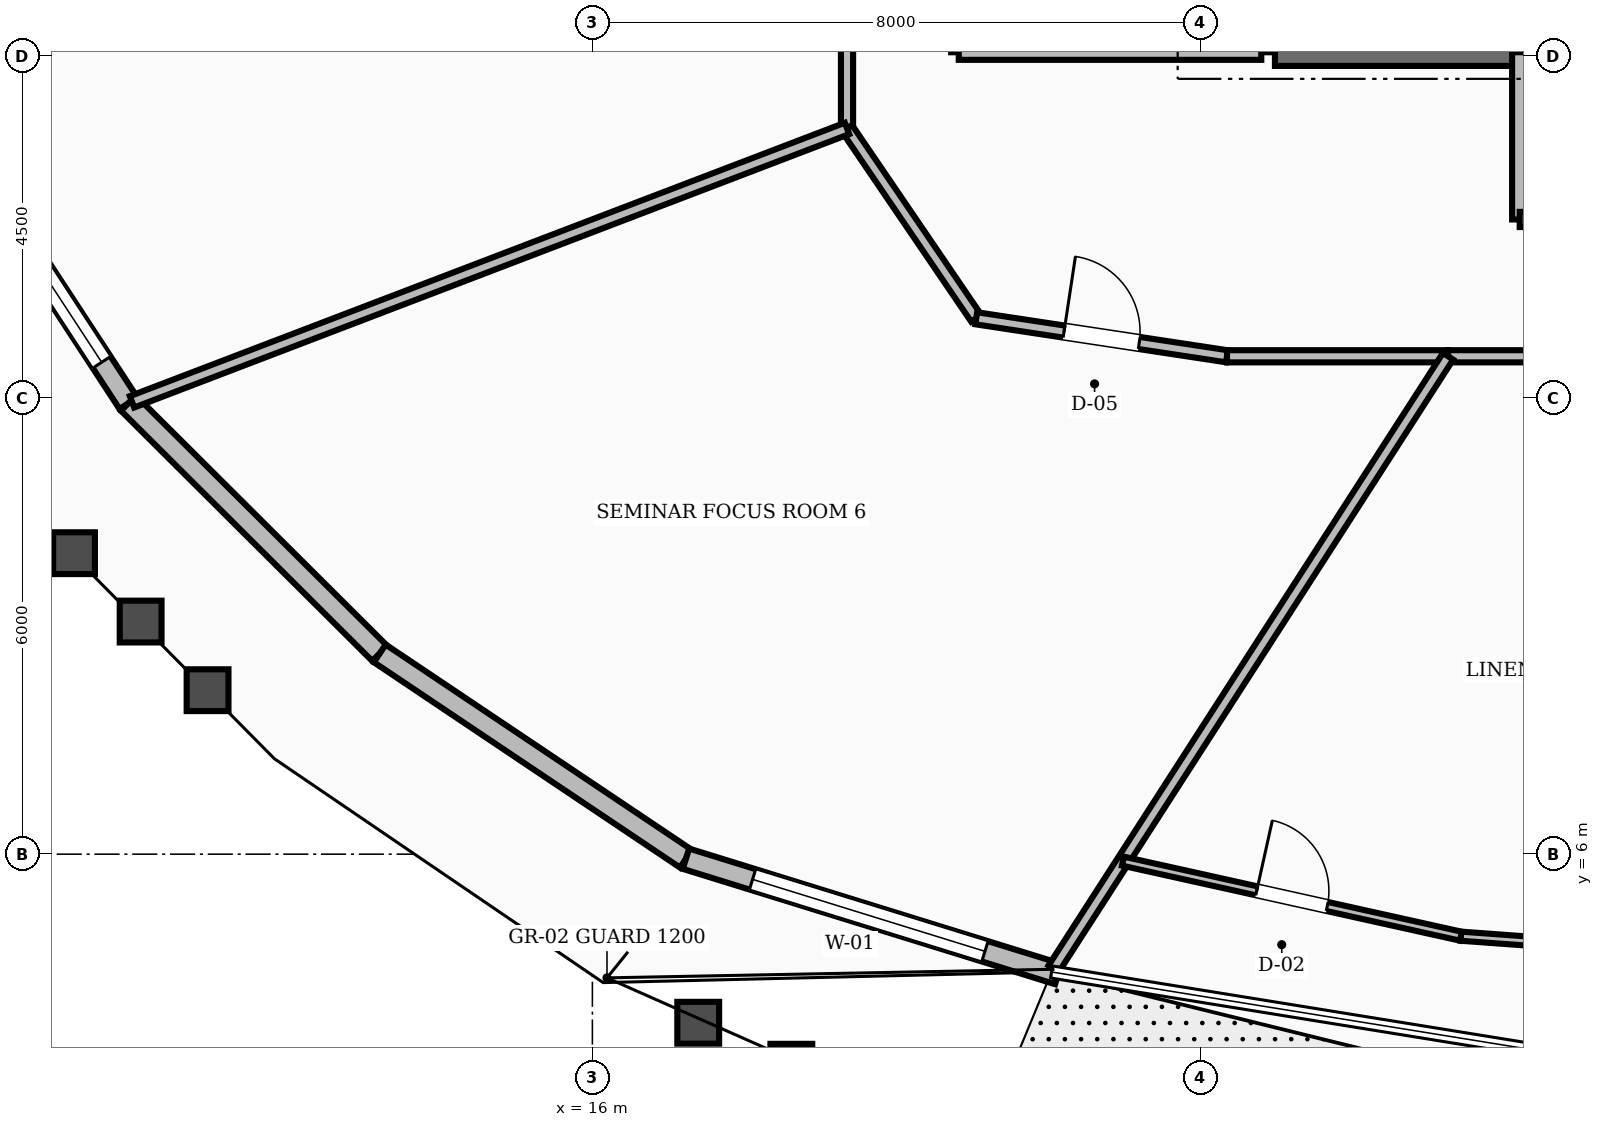
"""IFC4 building model, lengths in metres.
Left out: names, types, materials, properties, quantities, classifications, styles, units other than length and angle.
Written with IfcOpenShell. Run it as: python <this file> out.ifc"""

import sys

from ifc_helpers import new_model, si_unit, direction, frame, frame_2d, origin, place, context, subcontext, project, spatial, rectangle, extrude, element, fill, save


model = new_model("IFC4")
c1 = context("Model", 3, precision=1e-05, world=origin(), true_north=direction((0.0, 1.0)))
c2 = subcontext(c1, "Body", "Model", "MODEL_VIEW")
j1 = project(units=[si_unit("LENGTHUNIT", "METRE"), si_unit("PLANEANGLEUNIT", "RADIAN")], contexts=[c1])
p1 = place(None, origin())
s1 = spatial("IfcSite", under=j1, at=p1, CompositionType="ELEMENT")
p2 = place(p1, origin())
s2 = spatial("IfcBuilding", under=s1, at=p2, CompositionType="ELEMENT")
p3 = place(p2, frame((0.0, 0.0, 131.6)))
s3 = spatial("IfcBuildingStorey", under=s2, at=p3, CompositionType="ELEMENT", Elevation=131.6)
p4 = place(p3, frame((24.98, 16.55, 0.0), z_axis=(0.0, 0.0, 1.0), x_axis=(1.0, 0.0, 0.0)))
e1 = element("IfcWall", 1, at=p4, inside=s3, PredefinedType="SHEAR", context=c2, shape_type="SweptSolid", body=[
    extrude(rectangle(XDim=3.22, YDim=0.36, at=frame_2d((1.61, 0.0))), origin(), (0.0, 0.0, 1.0), 3.6),
])
p5 = place(p3, frame((7.44, 15.688, 0.0), z_axis=(0.0, 0.0, 1.0), x_axis=(0.547422319482, -0.836856501518, 0.0)))
e2 = element("IfcWall", 2, at=p5, inside=s3, PredefinedType="STANDARD", context=c2, shape_type="SweptSolid", body=[
    extrude(rectangle(XDim=4.488, YDim=0.28, at=frame_2d((2.244, 0.0))), origin(), (0.0, 0.0, 1.0), 2.82),
])
p6 = place(p5, frame((0.644, 0.0, 0.8)))
e3 = element("IfcOpeningElement", 3, at=p6, cuts=e2, PredefinedType="OPENING", context=c2, shape_type="SweptSolid", body=[
    extrude(rectangle(XDim=3.2, YDim=1.65, at=frame_2d((1.6, 0.825))), frame((0.0, 0.15, 0.0), z_axis=(0.0, -1.0, 0.0), x_axis=(1.0, 0.0, 0.0)), (0.0, 0.0, 1.0), 0.3),
])
p7 = place(p3, frame((9.896, 11.933, 0.0), z_axis=(0.0, 0.0, 1.0), x_axis=(0.708648936292, -0.705561255379, 0.0)))
e4 = element("IfcWall", 4, at=p7, inside=s3, PredefinedType="STANDARD", context=c2, shape_type="SweptSolid", body=[
    extrude(rectangle(XDim=4.665, YDim=0.28, at=frame_2d((2.333, 0.0))), origin(), (0.0, 0.0, 1.0), 2.82),
])
p8 = place(p3, frame((13.202, 8.641, 0.0), z_axis=(0.0, 0.0, 1.0), x_axis=(0.830576039751, -0.556905236277, 0.0)))
e5 = element("IfcWall", 5, at=p8, inside=s3, PredefinedType="STANDARD", context=c2, shape_type="SweptSolid", body=[
    extrude(rectangle(XDim=4.85, YDim=0.28, at=frame_2d((2.425, 0.0))), origin(), (0.0, 0.0, 1.0), 2.82),
])
p9 = place(p3, frame((17.231, 5.94, 0.0), z_axis=(0.0, 0.0, 1.0), x_axis=(0.955245215398, -0.295815108571, 0.0)))
e6 = element("IfcWall", 6, at=p9, inside=s3, PredefinedType="STANDARD", context=c2, shape_type="SweptSolid", body=[
    extrude(rectangle(XDim=5.128, YDim=0.28, at=frame_2d((2.564, 0.0))), origin(), (0.0, 0.0, 1.0), 2.82),
])
p10 = place(p9, frame((0.918, 0.0, 0.8)))
e7 = element("IfcOpeningElement", 7, at=p10, cuts=e6, PredefinedType="OPENING", context=c2, shape_type="SweptSolid", body=[
    extrude(rectangle(XDim=3.2, YDim=1.65, at=frame_2d((1.6, 0.825))), frame((0.0, 0.15, 0.0), z_axis=(0.0, -1.0, 0.0), x_axis=(1.0, 0.0, 0.0)), (0.0, 0.0, 1.0), 0.3),
])
p11 = place(p3, frame((20.82, 16.55, 0.0), z_axis=(0.0, 0.0, 1.0), x_axis=(1.0, 0.0, 0.0)))
e8 = element("IfcWall", 8, at=p11, inside=s3, PredefinedType="SOLIDWALL", context=c2, shape_type="SweptSolid", body=[
    extrude(rectangle(XDim=3.98, YDim=0.2, at=frame_2d((1.99, 0.0))), origin(), (0.0, 0.0, 1.0), 2.8),
])
p12 = place(p3, frame((28.2, 14.35, 0.0), z_axis=(0.0, 0.0, 1.0), x_axis=(0.0, 1.0, 0.0)))
e9 = element("IfcWall", 9, at=p12, inside=s3, PredefinedType="SOLIDWALL", context=c2, shape_type="SweptSolid", body=[
    extrude(rectangle(XDim=2.2, YDim=0.2, at=frame_2d((1.1, 0.0))), origin(), (0.0, 0.0, 1.0), 2.8),
])
p13 = place(p3, frame((28.2, 14.35, 0.0), z_axis=(0.0, 0.0, 1.0), x_axis=(1.0, 0.0, 0.0)))
e10 = element("IfcWall", 10, at=p13, inside=s3, PredefinedType="SOLIDWALL", context=c2, shape_type="SweptSolid", body=[
    extrude(rectangle(XDim=7.6, YDim=0.2, at=frame_2d((3.8, 0.0))), origin(), (0.0, 0.0, 1.0), 2.8),
])
p14 = place(p13, frame((3.2, 0.0, 0.0)))
e11 = element("IfcOpeningElement", 11, at=p14, cuts=e10, PredefinedType="OPENING", context=c2, shape_type="SweptSolid", body=[
    extrude(rectangle(XDim=1.2, YDim=2.1, at=frame_2d((0.6, 1.05))), frame((0.0, 0.11, 0.0), z_axis=(0.0, -1.0, 0.0), x_axis=(1.0, 0.0, 0.0)), (0.0, 0.0, 1.0), 0.22),
])
p15 = place(p3, frame((19.35, 18.76, 0.0), z_axis=(0.0, 0.0, 1.0), x_axis=(0.0, -1.0, 0.0)))
e12 = element("IfcWall", 12, at=p15, inside=s3, PredefinedType="SOLIDWALL", context=c2, shape_type="SweptSolid", body=[
    extrude(rectangle(XDim=3.213, YDim=0.16, at=frame_2d((1.606, 0.0))), origin(), (0.0, 0.0, 1.0), 2.8),
])
p16 = place(p3, frame((19.35, 15.548, 0.0), z_axis=(0.0, 0.0, 1.0), x_axis=(0.562674669208, -0.826678423955, 0.0)))
e13 = element("IfcWall", 13, at=p16, inside=s3, PredefinedType="SOLIDWALL", context=c2, shape_type="SweptSolid", body=[
    extrude(rectangle(XDim=3.021, YDim=0.16, at=frame_2d((1.511, 0.0))), origin(), (0.0, 0.0, 1.0), 2.8),
])
p17 = place(p3, frame((21.05, 13.05, 0.0), z_axis=(0.0, 0.0, 1.0), x_axis=(0.988710906508, -0.149835721217, 0.0)))
e14 = element("IfcWall", 14, at=p17, inside=s3, PredefinedType="SOLIDWALL", context=c2, shape_type="SweptSolid", body=[
    extrude(rectangle(XDim=3.337, YDim=0.16, at=frame_2d((1.668, 0.0))), origin(), (0.0, 0.0, 1.0), 2.8),
])
p18 = place(p17, frame((1.168, 0.0, 0.0)))
e15 = element("IfcOpeningElement", 15, at=p18, cuts=e14, PredefinedType="OPENING", context=c2, shape_type="SweptSolid", body=[
    extrude(rectangle(XDim=1.0, YDim=2.1, at=frame_2d((0.5, 1.05))), frame((0.0, 0.09, 0.0), z_axis=(0.0, -1.0, 0.0), x_axis=(1.0, 0.0, 0.0)), (0.0, 0.0, 1.0), 0.18),
])
p19 = place(p3, frame((24.349, 12.55, 0.0), z_axis=(0.0, 0.0, 1.0), x_axis=(1.0, 0.0, 0.0)))
e16 = element("IfcWall", 16, at=p19, inside=s3, PredefinedType="SOLIDWALL", context=c2, shape_type="SweptSolid", body=[
    extrude(rectangle(XDim=2.908, YDim=0.16, at=frame_2d((1.454, 0.0))), origin(), (0.0, 0.0, 1.0), 2.8),
])
p20 = place(p3, frame((27.257, 12.55, 0.0), z_axis=(0.0, 0.0, 1.0), x_axis=(1.0, 0.0, 0.0)))
e17 = element("IfcWall", 17, at=p20, inside=s3, PredefinedType="SOLIDWALL", context=c2, shape_type="SweptSolid", body=[
    extrude(rectangle(XDim=2.465, YDim=0.16, at=frame_2d((1.232, 0.0))), origin(), (0.0, 0.0, 1.0), 2.8),
])
p21 = place(p3, frame((19.35, 15.548, 0.0), z_axis=(0.0, 0.0, 1.0), x_axis=(-0.934047315804, -0.357149285088, 0.0)))
e18 = element("IfcWall", 18, at=p21, inside=s3, PredefinedType="SOLIDWALL", context=c2, shape_type="SweptSolid", body=[
    extrude(rectangle(XDim=10.071, YDim=0.16, at=frame_2d((5.036, 0.0))), origin(), (0.0, 0.0, 1.0), 2.8),
])
p22 = place(p3, frame((27.257, 12.55, 0.0), z_axis=(0.0, 0.0, 1.0), x_axis=(-0.541415324631, -0.840755283215, 0.0)))
e19 = element("IfcWall", 19, at=p22, inside=s3, PredefinedType="SOLIDWALL", context=c2, shape_type="SweptSolid", body=[
    extrude(rectangle(XDim=9.584, YDim=0.16, at=frame_2d((4.792, 0.0))), origin(), (0.0, 0.0, 1.0), 2.8),
])
p23 = place(p3, frame((22.98, 5.908, 0.0), z_axis=(0.0, 0.0, 1.0), x_axis=(0.976218575883, -0.216788588495, 0.0)))
e20 = element("IfcWall", 20, at=p23, inside=s3, PredefinedType="PARTITIONING", context=c2, shape_type="SweptSolid", body=[
    extrude(rectangle(XDim=4.555, YDim=0.12, at=frame_2d((2.278, 0.0))), origin(), (0.0, 0.0, 1.0), 2.8),
])
p24 = place(p23, frame((1.802, 0.0, 0.0)))
e21 = element("IfcOpeningElement", 21, at=p24, cuts=e20, PredefinedType="OPENING", context=c2, shape_type="SweptSolid", body=[
    extrude(rectangle(XDim=0.95, YDim=2.1, at=frame_2d((0.475, 1.05))), frame((0.0, 0.07, 0.0), z_axis=(0.0, -1.0, 0.0), x_axis=(1.0, 0.0, 0.0)), (0.0, 0.0, 1.0), 0.14),
])
p25 = place(p3, frame((27.427, 4.921, 0.0), z_axis=(0.0, 0.0, 1.0), x_axis=(0.997355230651, -0.072681110984, 0.0)))
e22 = element("IfcWall", 22, at=p25, inside=s3, PredefinedType="PARTITIONING", context=c2, shape_type="SweptSolid", body=[
    extrude(rectangle(XDim=4.585, YDim=0.12, at=frame_2d((2.292, 0.0))), origin(), (0.0, 0.0, 1.0), 2.8),
])
p26 = place(p6, origin())
e23 = element("IfcWindow", 23, at=p26, inside=s3, PartitioningType="SINGLE_PANEL", PredefinedType="WINDOW", context=c2, shape_type="SweptSolid", body=[
    extrude(rectangle(XDim=3.2, YDim=1.65, at=frame_2d((1.6, 0.825))), frame((0.0, 0.03, 0.0), z_axis=(0.0, -1.0, 0.0), x_axis=(1.0, 0.0, 0.0)), (0.0, 0.0, 1.0), 0.06),
])
fill(e3, e23)
p27 = place(p10, origin())
e24 = element("IfcWindow", 24, at=p27, inside=s3, PartitioningType="SINGLE_PANEL", PredefinedType="WINDOW", context=c2, shape_type="SweptSolid", body=[
    extrude(rectangle(XDim=3.2, YDim=1.65, at=frame_2d((1.6, 0.825))), frame((0.0, 0.03, 0.0), z_axis=(0.0, -1.0, 0.0), x_axis=(1.0, 0.0, 0.0)), (0.0, 0.0, 1.0), 0.06),
])
fill(e7, e24)
p28 = place(p18, origin())
e25 = element("IfcDoor", 25, at=p28, inside=s3, OperationType="SINGLE_SWING_LEFT", PredefinedType="DOOR", context=c2, shape_type="SweptSolid", body=[
    extrude(rectangle(XDim=1.0, YDim=2.1, at=frame_2d((0.5, 1.05))), frame((0.0, 0.025, 0.0), z_axis=(0.0, -1.0, 0.0), x_axis=(1.0, 0.0, 0.0)), (0.0, 0.0, 1.0), 0.05),
])
fill(e15, e25)
p29 = place(p24, origin())
e26 = element("IfcDoor", 26, at=p29, inside=s3, OperationType="SINGLE_SWING_LEFT", PredefinedType="DOOR", context=c2, shape_type="SweptSolid", body=[
    extrude(rectangle(XDim=0.95, YDim=2.1, at=frame_2d((0.475, 1.05))), frame((0.0, 0.025, 0.0), z_axis=(0.0, -1.0, 0.0), x_axis=(1.0, 0.0, 0.0)), (0.0, 0.0, 1.0), 0.05),
])
fill(e21, e26)
save(model, sys.argv[1])
